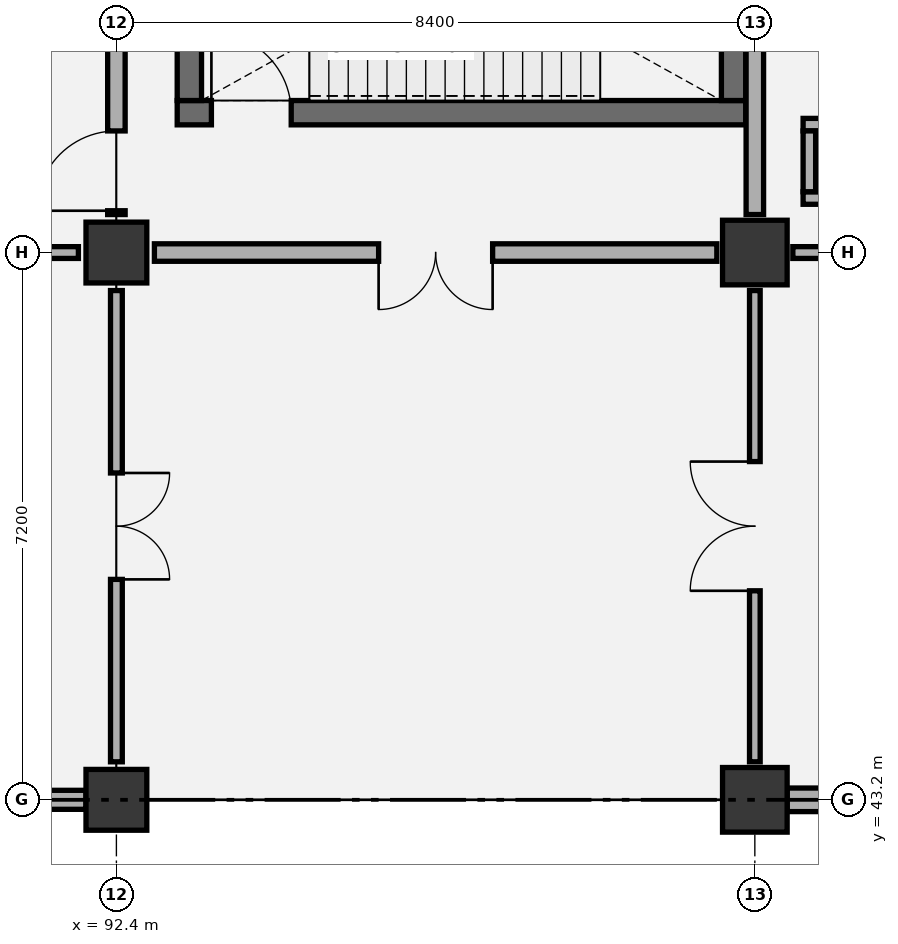
"""IFC4 building model, lengths in metres.
Left out: names, types, materials, properties, quantities, classifications, styles, units other than length and angle.
Written with IfcOpenShell. Run it as: python <this file> out.ifc"""

import sys

from ifc_helpers import new_model, si_unit, direction, frame, frame_2d, origin, origin_2d, place, context, subcontext, project, spatial, rectangle, extrude, element, fill, save


model = new_model("IFC4")
c1 = context("Model", 3, precision=1e-05, world=origin(), true_north=direction((0.0, 1.0)))
c2 = subcontext(c1, "Body", "Model", "MODEL_VIEW")
j1 = project(units=[si_unit("LENGTHUNIT", "METRE"), si_unit("PLANEANGLEUNIT", "RADIAN")], contexts=[c1])
p1 = place(None, origin())
s1 = spatial("IfcSite", under=j1, at=p1, CompositionType="ELEMENT")
p2 = place(p1, origin())
s2 = spatial("IfcBuilding", under=s1, at=p2, CompositionType="ELEMENT")
p3 = place(p2, frame((0.0, 0.0, 11.4)))
s3 = spatial("IfcBuildingStorey", under=s2, at=p3, CompositionType="ELEMENT", Elevation=11.4)
for number, where, z_axis, x_axis in (
    (1, (92.4, 43.2, 0.0), (0.0, 0.0, 1.0), (1.0, 0.0, 0.0)),
    (2, (92.4, 50.4, 0.0), (0.0, 0.0, 1.0), (1.0, 0.0, 0.0)),
):
    element("IfcColumn", number, at=place(p3, frame(where, z_axis=z_axis, x_axis=x_axis)), inside=s3, PredefinedType="COLUMN", context=c2, shape_type="SweptSolid", body=[
        extrude(rectangle(XDim=0.8, YDim=0.8, at=origin_2d()), origin(), (0.0, 0.0, 1.0), 5.4),
    ])
for number, where, z_axis, x_axis in (
    (3, (100.8, 43.2, 0.0), (0.0, 0.0, 1.0), (1.0, 0.0, 0.0)),
    (4, (100.8, 50.4, 0.0), (0.0, 0.0, 1.0), (1.0, 0.0, 0.0)),
):
    element("IfcColumn", number, at=place(p3, frame(where, z_axis=z_axis, x_axis=x_axis)), inside=s3, PredefinedType="COLUMN", context=c2, shape_type="SweptSolid", body=[
        extrude(rectangle(XDim=0.85, YDim=0.85, at=origin_2d()), origin(), (0.0, 0.0, 1.0), 5.4),
    ])
p4 = place(p3, frame((93.2, 52.24, 0.0), z_axis=(0.0, 0.0, 1.0), x_axis=(1.0, 0.0, 0.0)))
e5 = element("IfcWall", 5, at=p4, inside=s3, PredefinedType="SHEAR", context=c2, shape_type="SweptSolid", body=[
    extrude(rectangle(XDim=7.48, YDim=0.32, at=frame_2d((3.74, 0.0))), origin(), (0.0, 0.0, 1.0), 5.1),
])
p5 = place(p4, frame((0.45, 0.0, 0.0)))
e6 = element("IfcOpeningElement", 6, at=p5, cuts=e5, PredefinedType="OPENING", context=c2, shape_type="SweptSolid", body=[
    extrude(rectangle(XDim=1.05, YDim=2.15, at=frame_2d((0.525, 1.075))), frame((0.0, 0.17, 0.0), z_axis=(0.0, -1.0, 0.0), x_axis=(1.0, 0.0, 0.0)), (0.0, 0.0, 1.0), 0.34),
])
for number, where, z_axis, x_axis in (
    (7, (93.36, 52.4, 0.0), (0.0, 0.0, 1.0), (0.0, 1.0, 0.0)),
    (8, (100.52, 52.4, 0.0), (0.0, 0.0, 1.0), (0.0, 1.0, 0.0)),
):
    element("IfcWall", number, at=place(p3, frame(where, z_axis=z_axis, x_axis=x_axis)), inside=s3, PredefinedType="SHEAR", context=c2, shape_type="SweptSolid", body=[
        extrude(rectangle(XDim=3.8, YDim=0.32, at=frame_2d((1.9, 0.0))), origin(), (0.0, 0.0, 1.0), 5.1),
    ])
p6 = place(p3, frame((84.4, 43.2, 0.0), z_axis=(0.0, 0.0, 1.0), x_axis=(1.0, 0.0, 0.0)))
e9 = element("IfcWall", 9, at=p6, inside=s3, PredefinedType="SOLIDWALL", context=c2, shape_type="SweptSolid", body=[
    extrude(rectangle(XDim=7.6, YDim=0.25, at=frame_2d((3.8, 0.0))), origin(), (0.0, 0.0, 1.0), 4.445),
])
p7 = place(p6, frame((2.3, 0.0, 0.9)))
e10 = element("IfcOpeningElement", 10, at=p7, cuts=e9, PredefinedType="OPENING", context=c2, shape_type="SweptSolid", body=[
    extrude(rectangle(XDim=3.0, YDim=2.1, at=frame_2d((1.5, 1.05))), frame((0.0, 0.135, 0.0), z_axis=(0.0, -1.0, 0.0), x_axis=(1.0, 0.0, 0.0)), (0.0, 0.0, 1.0), 0.27),
])
p8 = place(p3, frame((101.225, 43.2, 0.0), z_axis=(0.0, 0.0, 1.0), x_axis=(1.0, 0.0, 0.0)))
e11 = element("IfcWall", 11, at=p8, inside=s3, PredefinedType="SOLIDWALL", context=c2, shape_type="SweptSolid", body=[
    extrude(rectangle(XDim=7.575, YDim=0.31, at=frame_2d((3.788, 0.0))), origin(), (0.0, 0.0, 1.0), 4.445),
])
p9 = place(p8, frame((2.363, 0.0, 0.9)))
e12 = element("IfcOpeningElement", 12, at=p9, cuts=e11, PredefinedType="OPENING", context=c2, shape_type="SweptSolid", body=[
    extrude(rectangle(XDim=2.85, YDim=1.95, at=frame_2d((1.425, 0.975))), frame((0.0, 0.165, 0.0), z_axis=(0.0, -1.0, 0.0), x_axis=(1.0, 0.0, 0.0)), (0.0, 0.0, 1.0), 0.33),
])
for number, where, z_axis, x_axis in (
    (13, (101.435, 51.117, 0.0), (0.0, 0.0, 1.0), (1.0, 0.0, 0.0)),
    (14, (101.435, 52.083, 0.0), (0.0, 0.0, 1.0), (1.0, 0.0, 0.0)),
):
    element("IfcWall", number, at=place(p3, frame(where, z_axis=z_axis, x_axis=x_axis)), inside=s3, PredefinedType="PARTITIONING", context=c2, shape_type="SweptSolid", body=[
        extrude(rectangle(XDim=1.43, YDim=0.165, at=frame_2d((0.715, 0.0))), origin(), (0.0, 0.0, 1.0), 5.1),
    ])
p10 = place(p3, frame((101.518, 51.2, 0.0), z_axis=(0.0, 0.0, 1.0), x_axis=(0.0, 1.0, 0.0)))
e15 = element("IfcWall", 15, at=p10, inside=s3, PredefinedType="PARTITIONING", context=c2, shape_type="SweptSolid", body=[
    extrude(rectangle(XDim=0.8, YDim=0.165, at=frame_2d((0.4, 0.0))), origin(), (0.0, 0.0, 1.0), 5.1),
])
p11 = place(p3, frame((92.4, 43.7, 0.0), z_axis=(0.0, 0.0, 1.0), x_axis=(0.0, 1.0, 0.0)))
e16 = element("IfcWall", 16, at=p11, inside=s3, PredefinedType="PARTITIONING", context=c2, shape_type="SweptSolid", body=[
    extrude(rectangle(XDim=6.2, YDim=0.155, at=frame_2d((3.1, 0.0))), origin(), (0.0, 0.0, 1.0), 4.395),
])
p12 = place(p11, frame((2.4, 0.0, 0.0)))
e17 = element("IfcOpeningElement", 17, at=p12, cuts=e16, PredefinedType="OPENING", context=c2, shape_type="SweptSolid", body=[
    extrude(rectangle(XDim=1.4, YDim=2.15, at=frame_2d((0.7, 1.075))), frame((0.0, 0.087, 0.0), z_axis=(0.0, -1.0, 0.0), x_axis=(1.0, 0.0, 0.0)), (0.0, 0.0, 1.0), 0.175),
])
p13 = place(p3, frame((84.5, 50.4, 0.0), z_axis=(0.0, 0.0, 1.0), x_axis=(1.0, 0.0, 0.0)))
e18 = element("IfcWall", 18, at=p13, inside=s3, PredefinedType="PARTITIONING", context=c2, shape_type="SweptSolid", body=[
    extrude(rectangle(XDim=7.4, YDim=0.155, at=frame_2d((3.7, 0.0))), origin(), (0.0, 0.0, 1.0), 4.345),
])
p14 = place(p13, frame((2.85, 0.0, 0.0)))
e19 = element("IfcOpeningElement", 19, at=p14, cuts=e18, PredefinedType="OPENING", context=c2, shape_type="SweptSolid", body=[
    extrude(rectangle(XDim=1.7, YDim=2.25, at=frame_2d((0.85, 1.125))), frame((0.0, 0.087, 0.0), z_axis=(0.0, -1.0, 0.0), x_axis=(1.0, 0.0, 0.0)), (0.0, 0.0, 1.0), 0.175),
])
p15 = place(p3, frame((92.4, 50.9, 0.0), z_axis=(0.0, 0.0, 1.0), x_axis=(0.0, 1.0, 0.0)))
e20 = element("IfcWall", 20, at=p15, inside=s3, PredefinedType="PARTITIONING", context=c2, shape_type="SweptSolid", body=[
    extrude(rectangle(XDim=6.2, YDim=0.23, at=frame_2d((3.1, 0.0))), origin(), (0.0, 0.0, 1.0), 4.805),
])
p16 = place(p15, frame((0.05, 0.0, 0.0)))
e21 = element("IfcOpeningElement", 21, at=p16, cuts=e20, PredefinedType="OPENING", context=c2, shape_type="SweptSolid", body=[
    extrude(rectangle(XDim=1.05, YDim=2.15, at=frame_2d((0.525, 1.075))), frame((0.0, 0.125, 0.0), z_axis=(0.0, -1.0, 0.0), x_axis=(1.0, 0.0, 0.0)), (0.0, 0.0, 1.0), 0.25),
])
p17 = place(p3, frame((100.8, 43.7, 0.0), z_axis=(0.0, 0.0, 1.0), x_axis=(0.0, 1.0, 0.0)))
e22 = element("IfcWall", 22, at=p17, inside=s3, PredefinedType="PARTITIONING", context=c2, shape_type="SweptSolid", body=[
    extrude(rectangle(XDim=6.2, YDim=0.14, at=frame_2d((3.1, 0.0))), origin(), (0.0, 0.0, 1.0), 4.805),
])
p18 = place(p17, frame((2.25, 0.0, 0.0)))
e23 = element("IfcOpeningElement", 23, at=p18, cuts=e22, PredefinedType="OPENING", context=c2, shape_type="SweptSolid", body=[
    extrude(rectangle(XDim=1.7, YDim=2.25, at=frame_2d((0.85, 1.125))), frame((0.0, 0.08, 0.0), z_axis=(0.0, -1.0, 0.0), x_axis=(1.0, 0.0, 0.0)), (0.0, 0.0, 1.0), 0.16),
])
p19 = place(p3, frame((92.9, 50.4, 0.0), z_axis=(0.0, 0.0, 1.0), x_axis=(1.0, 0.0, 0.0)))
e24 = element("IfcWall", 24, at=p19, inside=s3, PredefinedType="PARTITIONING", context=c2, shape_type="SweptSolid", body=[
    extrude(rectangle(XDim=7.4, YDim=0.23, at=frame_2d((3.7, 0.0))), origin(), (0.0, 0.0, 1.0), 4.345),
])
p20 = place(p19, frame((2.95, 0.0, 0.0)))
e25 = element("IfcOpeningElement", 25, at=p20, cuts=e24, PredefinedType="OPENING", context=c2, shape_type="SweptSolid", body=[
    extrude(rectangle(XDim=1.5, YDim=2.15, at=frame_2d((0.75, 1.075))), frame((0.0, 0.125, 0.0), z_axis=(0.0, -1.0, 0.0), x_axis=(1.0, 0.0, 0.0)), (0.0, 0.0, 1.0), 0.25),
])
p21 = place(p3, frame((100.8, 50.9, 0.0), z_axis=(0.0, 0.0, 1.0), x_axis=(0.0, 1.0, 0.0)))
e26 = element("IfcWall", 26, at=p21, inside=s3, PredefinedType="PARTITIONING", context=c2, shape_type="SweptSolid", body=[
    extrude(rectangle(XDim=6.2, YDim=0.23, at=frame_2d((3.1, 0.0))), origin(), (0.0, 0.0, 1.0), 4.395),
])
p22 = place(p3, frame((101.3, 50.4, 0.0), z_axis=(0.0, 0.0, 1.0), x_axis=(1.0, 0.0, 0.0)))
e27 = element("IfcWall", 27, at=p22, inside=s3, PredefinedType="PARTITIONING", context=c2, shape_type="SweptSolid", body=[
    extrude(rectangle(XDim=7.4, YDim=0.155, at=frame_2d((3.7, 0.0))), origin(), (0.0, 0.0, 1.0), 4.345),
])
p23 = place(p22, frame((2.85, 0.0, 0.0)))
e28 = element("IfcOpeningElement", 28, at=p23, cuts=e27, PredefinedType="OPENING", context=c2, shape_type="SweptSolid", body=[
    extrude(rectangle(XDim=1.7, YDim=2.25, at=frame_2d((0.85, 1.125))), frame((0.0, 0.087, 0.0), z_axis=(0.0, -1.0, 0.0), x_axis=(1.0, 0.0, 0.0)), (0.0, 0.0, 1.0), 0.175),
])
p24 = place(p5, origin())
e29 = element("IfcDoor", 29, at=p24, inside=s3, OperationType="SINGLE_SWING_LEFT", PredefinedType="DOOR", context=c2, shape_type="SweptSolid", body=[
    extrude(rectangle(XDim=1.05, YDim=2.15, at=frame_2d((0.525, 1.075))), frame((0.0, 0.025, 0.0), z_axis=(0.0, -1.0, 0.0), x_axis=(1.0, 0.0, 0.0)), (0.0, 0.0, 1.0), 0.05),
])
fill(e6, e29)
p25 = place(p12, frame((1.4, 0.0, 0.0), z_axis=(0.0, 0.0, 1.0), x_axis=(-1.0, 0.0, 0.0)))
e30 = element("IfcDoor", 30, at=p25, inside=s3, OperationType="DOUBLE_DOOR_SINGLE_SWING", PredefinedType="DOOR", context=c2, shape_type="SweptSolid", body=[
    extrude(rectangle(XDim=1.4, YDim=2.15, at=frame_2d((0.7, 1.075))), frame((0.0, 0.025, 0.0), z_axis=(0.0, -1.0, 0.0), x_axis=(1.0, 0.0, 0.0)), (0.0, 0.0, 1.0), 0.05),
])
fill(e17, e30)
p26 = place(p16, origin())
e31 = element("IfcDoor", 31, at=p26, inside=s3, OperationType="SINGLE_SWING_LEFT", PredefinedType="DOOR", context=c2, shape_type="SweptSolid", body=[
    extrude(rectangle(XDim=1.05, YDim=2.15, at=frame_2d((0.525, 1.075))), frame((0.0, 0.025, 0.0), z_axis=(0.0, -1.0, 0.0), x_axis=(1.0, 0.0, 0.0)), (0.0, 0.0, 1.0), 0.05),
])
fill(e21, e31)
p27 = place(p18, origin())
e32 = element("IfcDoor", 32, at=p27, inside=s3, OperationType="DOUBLE_DOOR_SINGLE_SWING", PredefinedType="DOOR", context=c2, shape_type="SweptSolid", body=[
    extrude(rectangle(XDim=1.7, YDim=2.25, at=frame_2d((0.85, 1.125))), frame((0.0, 0.025, 0.0), z_axis=(0.0, -1.0, 0.0), x_axis=(1.0, 0.0, 0.0)), (0.0, 0.0, 1.0), 0.05),
])
fill(e23, e32)
p28 = place(p20, frame((1.5, 0.0, 0.0), z_axis=(0.0, 0.0, 1.0), x_axis=(-1.0, 0.0, 0.0)))
e33 = element("IfcDoor", 33, at=p28, inside=s3, OperationType="DOUBLE_DOOR_SINGLE_SWING", PredefinedType="DOOR", context=c2, shape_type="SweptSolid", body=[
    extrude(rectangle(XDim=1.5, YDim=2.15, at=frame_2d((0.75, 1.075))), frame((0.0, 0.025, 0.0), z_axis=(0.0, -1.0, 0.0), x_axis=(1.0, 0.0, 0.0)), (0.0, 0.0, 1.0), 0.05),
])
fill(e25, e33)
save(model, sys.argv[1])
